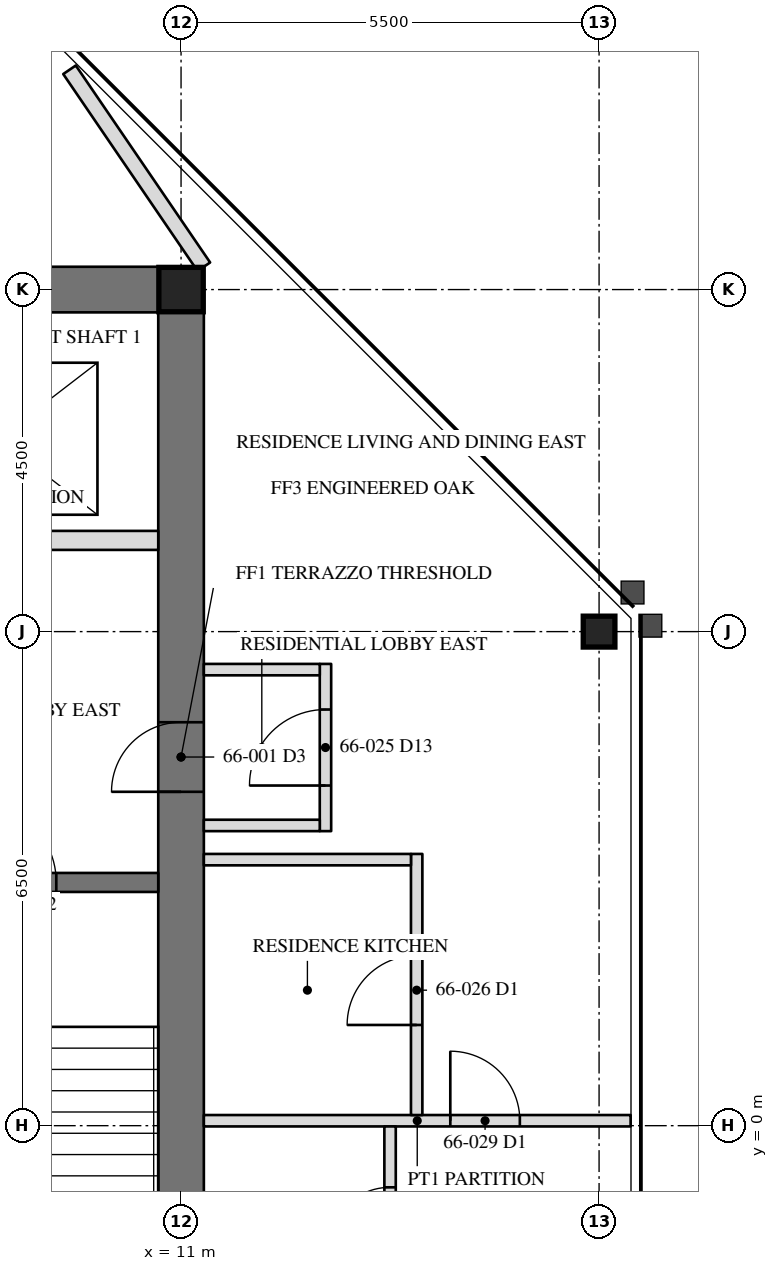
"""IFC4 building model, lengths in metres.
Left out: names, types, materials, properties, quantities, classifications, styles, units other than length and angle.
Written with IfcOpenShell. Run it as: python <this file> out.ifc"""

import sys

from ifc_helpers import new_model, si_unit, direction, frame, frame_2d, origin, origin_2d, place, context, subcontext, project, spatial, rectangle, hollow_rectangle, i_section, extrude, element, fill, save


model = new_model("IFC4")
c1 = context("Model", 3, precision=1e-05, world=origin(), true_north=direction((0.0, 1.0)))
c2 = subcontext(c1, "Body", "Model", "MODEL_VIEW")
j1 = project(units=[si_unit("LENGTHUNIT", "METRE"), si_unit("PLANEANGLEUNIT", "RADIAN")], contexts=[c1])
p1 = place(None, origin())
s1 = spatial("IfcSite", under=j1, at=p1, CompositionType="ELEMENT")
p2 = place(p1, origin())
s2 = spatial("IfcBuilding", under=s1, at=p2, CompositionType="ELEMENT")
p3 = place(p2, frame((0.0, 0.0, 270.4)))
s3 = spatial("IfcBuildingStorey", under=s2, at=p3, CompositionType="ELEMENT", Elevation=270.4)
p4 = place(p3, frame((16.5, 6.5, 0.0), z_axis=(0.0, 0.0, 1.0), x_axis=(0.0, 1.0, 0.0)))
e1 = element("IfcColumn", 1, at=p4, inside=s3, PredefinedType="COLUMN", context=c2, shape_type="SweptSolid", body=[
    extrude(i_section(OverallWidth=0.406, OverallDepth=0.417, WebThickness=0.03, FlangeThickness=0.048, at=origin_2d()), origin(), (0.0, 0.0, 1.0), 3.6),
])
p5 = place(p3, frame((11.0, -11.0, 0.0), z_axis=(0.0, 0.0, 1.0), x_axis=(0.0, 1.0, 0.0)))
e2 = element("IfcWall", 2, at=p5, inside=s3, PredefinedType="SHEAR", context=c2, shape_type="SweptSolid", body=[
    extrude(rectangle(XDim=22.0, YDim=0.6, at=frame_2d((11.0, 0.0))), origin(), (0.0, 0.0, 1.0), 3.6),
])
p6 = place(p5, frame((15.393, 0.0, 0.0)))
e3 = element("IfcOpeningElement", 3, at=p6, cuts=e2, PredefinedType="OPENING", context=c2, shape_type="SweptSolid", body=[
    extrude(rectangle(XDim=0.915, YDim=2.134, at=frame_2d((0.458, 1.067))), frame((0.0, 0.31, 0.0), z_axis=(0.0, -1.0, 0.0), x_axis=(1.0, 0.0, 0.0)), (0.0, 0.0, 1.0), 0.62),
])
p7 = place(p3, frame((11.0, 11.0, 0.0), z_axis=(0.0, 0.0, 1.0), x_axis=(-1.0, 0.0, 0.0)))
e4 = element("IfcWall", 4, at=p7, inside=s3, PredefinedType="SHEAR", context=c2, shape_type="SweptSolid", body=[
    extrude(rectangle(XDim=4.5, YDim=0.6, at=frame_2d((2.25, 0.0))), origin(), (0.0, 0.0, 1.0), 3.6),
])
p8 = place(p3, frame((11.0, 11.0, 0.0), z_axis=(0.0, 0.0, 1.0), x_axis=(1.0, 0.0, 0.0)))
e5 = element("IfcColumn", 5, at=p8, inside=s3, PredefinedType="COLUMN", context=c2, shape_type="SweptSolid", body=[
    extrude(hollow_rectangle(XDim=0.584, YDim=0.584, WallThickness=0.051, at=origin_2d()), origin(), (0.0, 0.0, 1.0), 3.6),
])
p9 = place(p3, frame((6.95, 3.2, 0.0), z_axis=(0.0, 0.0, 1.0), x_axis=(1.0, 0.0, 0.0)))
e6 = element("IfcWall", 6, at=p9, inside=s3, PredefinedType="SOLIDWALL", context=c2, shape_type="SweptSolid", body=[
    extrude(rectangle(XDim=3.75, YDim=0.25, at=frame_2d((1.875, 0.0))), origin(), (0.0, 0.0, 1.0), 3.41),
])
p10 = place(p9, frame((1.342, 0.0, 0.0)))
e7 = element("IfcOpeningElement", 7, at=p10, cuts=e6, PredefinedType="OPENING", context=c2, shape_type="SweptSolid", body=[
    extrude(rectangle(XDim=1.067, YDim=2.134, at=frame_2d((0.533, 1.067))), frame((0.0, 0.135, 0.0), z_axis=(0.0, -1.0, 0.0), x_axis=(1.0, 0.0, 0.0)), (0.0, 0.0, 1.0), 0.27),
])
p11 = place(p3, frame((6.95, 7.7, 0.0), z_axis=(0.0, 0.0, 1.0), x_axis=(1.0, 0.0, 0.0)))
e8 = element("IfcWall", 8, at=p11, inside=s3, PredefinedType="PARTITIONING", context=c2, shape_type="SweptSolid", body=[
    extrude(rectangle(XDim=3.75, YDim=0.25, at=frame_2d((1.875, 0.0))), origin(), (0.0, 0.0, 1.0), 3.41),
])
p12 = place(p11, frame((0.45, 0.0, 0.0)))
e9 = element("IfcOpeningElement", 9, at=p12, cuts=e8, PredefinedType="OPENING", context=c2, shape_type="SweptSolid", body=[
    extrude(rectangle(XDim=1.219, YDim=2.134, at=frame_2d((0.609, 1.067))), frame((0.0, 0.135, 0.0), z_axis=(0.0, -1.0, 0.0), x_axis=(1.0, 0.0, 0.0)), (0.0, 0.0, 1.0), 0.27),
])
p13 = place(p3, frame((11.3, 11.3, 0.0), z_axis=(0.0, 0.0, 1.0), x_axis=(-0.563469639691, 0.826136771453, 0.0)))
e10 = element("IfcWall", 10, at=p13, inside=s3, PredefinedType="PARTITIONING", context=c2, shape_type="SweptSolid", body=[
    extrude(rectangle(XDim=3.137, YDim=0.2, at=frame_2d((1.568, 0.0))), origin(), (0.0, 0.0, 1.0), 2.704),
])
p14 = place(p3, frame((11.3, 0.065, 0.0), z_axis=(0.0, 0.0, 1.0), x_axis=(1.0, 0.0, 0.0)))
e11 = element("IfcWall", 11, at=p14, inside=s3, PredefinedType="PARTITIONING", context=c2, shape_type="SweptSolid", body=[
    extrude(rectangle(XDim=5.615, YDim=0.15, at=frame_2d((2.808, 0.0))), origin(), (0.0, 0.0, 1.0), 2.709),
])
p15 = place(p14, frame((3.242, 0.0, 0.0)))
e12 = element("IfcOpeningElement", 12, at=p15, cuts=e11, PredefinedType="OPENING", context=c2, shape_type="SweptSolid", body=[
    extrude(rectangle(XDim=0.915, YDim=2.134, at=frame_2d((0.458, 1.067))), frame((0.0, 0.085, 0.0), z_axis=(0.0, -1.0, 0.0), x_axis=(1.0, 0.0, 0.0)), (0.0, 0.0, 1.0), 0.17),
])
p16 = place(p3, frame((12.9, 3.875, 0.0), z_axis=(0.0, 0.0, 1.0), x_axis=(0.0, 1.0, 0.0)))
e13 = element("IfcWall", 13, at=p16, inside=s3, PredefinedType="PARTITIONING", context=c2, shape_type="SweptSolid", body=[
    extrude(rectangle(XDim=2.2, YDim=0.15, at=frame_2d((1.1, 0.0))), origin(), (0.0, 0.0, 1.0), 3.41),
])
p17 = place(p16, frame((0.6, 0.0, 0.0)))
e14 = element("IfcOpeningElement", 14, at=p17, cuts=e13, PredefinedType="OPENING", context=c2, shape_type="SweptSolid", body=[
    extrude(rectangle(XDim=1.0, YDim=2.134, at=frame_2d((0.5, 1.067))), frame((0.0, 0.085, 0.0), z_axis=(0.0, -1.0, 0.0), x_axis=(1.0, 0.0, 0.0)), (0.0, 0.0, 1.0), 0.17),
])
for number, where, z_axis, x_axis in (
    (15, (11.3, 3.95, 0.0), (0.0, 0.0, 1.0), (1.0, 0.0, 0.0)),
    (16, (11.3, 6.0, 0.0), (0.0, 0.0, 1.0), (1.0, 0.0, 0.0)),
):
    element("IfcWall", number, at=place(p3, frame(where, z_axis=z_axis, x_axis=x_axis)), inside=s3, PredefinedType="PARTITIONING", context=c2, shape_type="SweptSolid", body=[
        extrude(rectangle(XDim=1.525, YDim=0.15, at=frame_2d((0.762, 0.0))), origin(), (0.0, 0.0, 1.0), 3.41),
    ])
p18 = place(p3, frame((14.1, 0.14, 0.0), z_axis=(0.0, 0.0, 1.0), x_axis=(0.0, 1.0, 0.0)))
e17 = element("IfcWall", 17, at=p18, inside=s3, PredefinedType="PARTITIONING", context=c2, shape_type="SweptSolid", body=[
    extrude(rectangle(XDim=3.435, YDim=0.15, at=frame_2d((1.718, 0.0))), origin(), (0.0, 0.0, 1.0), 3.41),
])
p19 = place(p18, frame((1.185, 0.0, 0.0)))
e18 = element("IfcOpeningElement", 18, at=p19, cuts=e17, PredefinedType="OPENING", context=c2, shape_type="SweptSolid", body=[
    extrude(rectangle(XDim=0.915, YDim=2.134, at=frame_2d((0.458, 1.067))), frame((0.0, 0.085, 0.0), z_axis=(0.0, -1.0, 0.0), x_axis=(1.0, 0.0, 0.0)), (0.0, 0.0, 1.0), 0.17),
])
p20 = place(p3, frame((11.3, 3.5, 0.0), z_axis=(0.0, 0.0, 1.0), x_axis=(1.0, 0.0, 0.0)))
e19 = element("IfcWall", 19, at=p20, inside=s3, PredefinedType="PARTITIONING", context=c2, shape_type="SweptSolid", body=[
    extrude(rectangle(XDim=2.725, YDim=0.15, at=frame_2d((1.362, 0.0))), origin(), (0.0, 0.0, 1.0), 3.41),
])
p21 = place(p3, frame((13.75, -2.575, 0.0), z_axis=(0.0, 0.0, 1.0), x_axis=(0.0, 1.0, 0.0)))
e20 = element("IfcWall", 20, at=p21, inside=s3, PredefinedType="PARTITIONING", context=c2, shape_type="SweptSolid", body=[
    extrude(rectangle(XDim=2.565, YDim=0.15, at=frame_2d((1.282, 0.0))), origin(), (0.0, 0.0, 1.0), 3.41),
])
p22 = place(p21, frame((0.951, 0.0, 0.0)))
e21 = element("IfcOpeningElement", 21, at=p22, cuts=e20, PredefinedType="OPENING", context=c2, shape_type="SweptSolid", body=[
    extrude(rectangle(XDim=0.813, YDim=2.032, at=frame_2d((0.406, 1.016))), frame((0.0, 0.085, 0.0), z_axis=(0.0, -1.0, 0.0), x_axis=(1.0, 0.0, 0.0)), (0.0, 0.0, 1.0), 0.17),
])
p23 = place(p6, origin())
e22 = element("IfcDoor", 22, at=p23, inside=s3, OperationType="SINGLE_SWING_RIGHT", PredefinedType="DOOR", context=c2, shape_type="SweptSolid", body=[
    extrude(rectangle(XDim=0.915, YDim=2.134, at=frame_2d((0.458, 1.067))), frame((0.0, -0.225, 0.0), z_axis=(0.0, -1.0, 0.0), x_axis=(1.0, 0.0, 0.0)), (0.0, 0.0, 1.0), 0.05),
])
fill(e3, e22)
p24 = place(p10, origin())
e23 = element("IfcDoor", 23, at=p24, inside=s3, OperationType="SINGLE_SWING_LEFT", PredefinedType="DOOR", context=c2, shape_type="SweptSolid", body=[
    extrude(rectangle(XDim=1.067, YDim=2.134, at=frame_2d((0.533, 1.067))), frame((0.0, 0.025, 0.0), z_axis=(0.0, -1.0, 0.0), x_axis=(1.0, 0.0, 0.0)), (0.0, 0.0, 1.0), 0.05),
])
fill(e7, e23)
p25 = place(p17, origin())
e24 = element("IfcDoor", 24, at=p25, inside=s3, OperationType="SINGLE_SWING_RIGHT", PredefinedType="DOOR", context=c2, shape_type="SweptSolid", body=[
    extrude(rectangle(XDim=1.0, YDim=2.134, at=frame_2d((0.5, 1.067))), frame((0.0, 0.025, 0.0), z_axis=(0.0, -1.0, 0.0), x_axis=(1.0, 0.0, 0.0)), (0.0, 0.0, 1.0), 0.05),
])
fill(e14, e24)
p26 = place(p19, origin())
e25 = element("IfcDoor", 25, at=p26, inside=s3, OperationType="SINGLE_SWING_LEFT", PredefinedType="DOOR", context=c2, shape_type="SweptSolid", body=[
    extrude(rectangle(XDim=0.915, YDim=2.134, at=frame_2d((0.458, 1.067))), frame((0.0, 0.025, 0.0), z_axis=(0.0, -1.0, 0.0), x_axis=(1.0, 0.0, 0.0)), (0.0, 0.0, 1.0), 0.05),
])
fill(e18, e25)
p27 = place(p22, origin())
e26 = element("IfcDoor", 26, at=p27, inside=s3, OperationType="SINGLE_SWING_LEFT", PredefinedType="DOOR", context=c2, shape_type="SweptSolid", body=[
    extrude(rectangle(XDim=0.813, YDim=2.032, at=frame_2d((0.406, 1.016))), frame((0.0, 0.025, 0.0), z_axis=(0.0, -1.0, 0.0), x_axis=(1.0, 0.0, 0.0)), (0.0, 0.0, 1.0), 0.05),
])
fill(e21, e26)
p28 = place(p15, origin())
e27 = element("IfcDoor", 27, at=p28, inside=s3, OperationType="SINGLE_SWING_LEFT", PredefinedType="DOOR", context=c2, shape_type="SweptSolid", body=[
    extrude(rectangle(XDim=0.915, YDim=2.134, at=frame_2d((0.458, 1.067))), frame((0.0, 0.025, 0.0), z_axis=(0.0, -1.0, 0.0), x_axis=(1.0, 0.0, 0.0)), (0.0, 0.0, 1.0), 0.05),
])
fill(e12, e27)
save(model, sys.argv[1])
